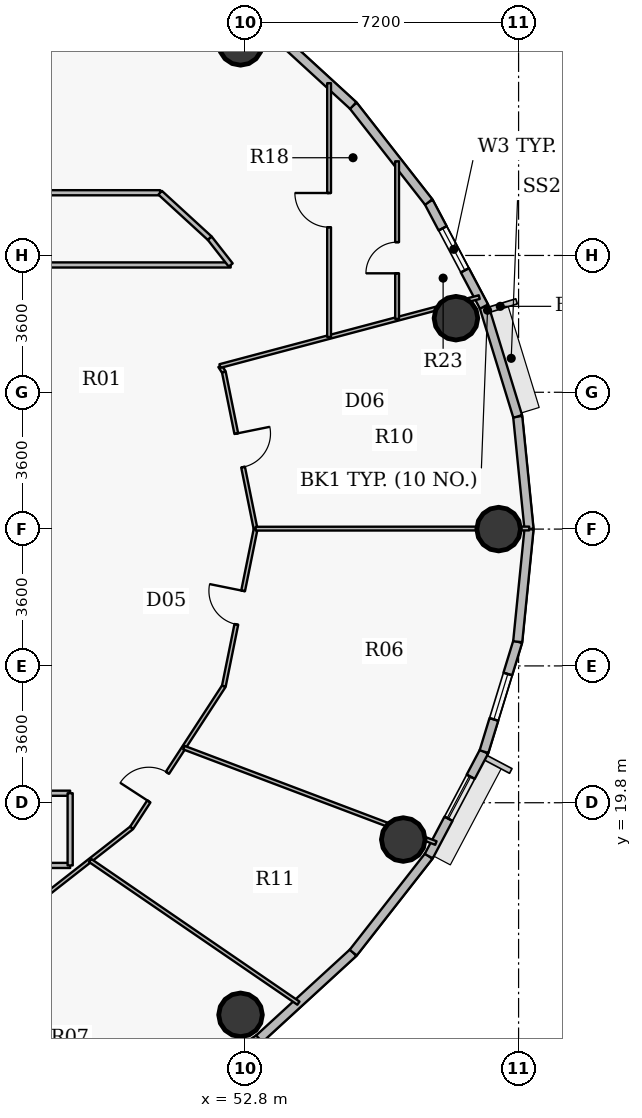
"""IFC4 building model, lengths in metres.
Left out: names, types, materials, properties, quantities, classifications, styles, units other than length and angle.
Written with IfcOpenShell. Run it as: python <this file> out.ifc"""

import sys

from ifc_helpers import new_model, si_unit, direction, frame, frame_2d, origin, origin_2d, place, context, subcontext, project, spatial, rectangle, hollow_circle, extrude, source, transform, mapped, element, fill, save


model = new_model("IFC4")
c1 = context("Model", 3, precision=1e-05, world=origin(), true_north=direction((0.0, 1.0)))
c2 = subcontext(c1, "Body", "Model", "MODEL_VIEW")
j1 = project(units=[si_unit("LENGTHUNIT", "METRE"), si_unit("PLANEANGLEUNIT", "RADIAN")], contexts=[c1])
p1 = place(None, origin())
s1 = spatial("IfcSite", under=j1, at=p1, CompositionType="ELEMENT")
p2 = place(p1, origin())
s2 = spatial("IfcBuilding", under=s1, at=p2, CompositionType="ELEMENT")
p3 = place(p2, frame((0.0, 0.0, 244.05)))
s3 = spatial("IfcBuildingStorey", under=s2, at=p3, CompositionType="ELEMENT", Elevation=244.05)
for number, where, z_axis, x_axis in (
    (1, (59.475, 27.0, 0.0), (0.0, 0.0, 1.0), (1.0, 0.0, 0.0)),
    (2, (58.351, 32.549, 0.0), (0.0, 0.0, 1.0), (1.0, 0.0, 0.0)),
    (3, (52.683, 39.781, 0.0), (0.0, 0.0, 1.0), (1.0, 0.0, 0.0)),
    (4, (52.683, 14.219, 0.0), (0.0, 0.0, 1.0), (1.0, 0.0, 0.0)),
    (5, (56.965, 18.831, 0.0), (0.0, 0.0, 1.0), (1.0, 0.0, 0.0)),
):
    element("IfcColumn", number, at=place(p3, frame(where, z_axis=z_axis, x_axis=x_axis)), inside=s3, PredefinedType="COLUMN", context=c2, shape_type="SweptSolid", body=[
        extrude(hollow_circle(Radius=0.575, WallThickness=0.036, at=origin_2d()), origin(), (0.0, 0.0, 1.0), 3.75),
    ])
p4 = place(p3, frame((59.977, 29.964, 0.0), z_axis=(0.0, 0.0, 1.0), x_axis=(0.099990595253, -0.994988382274, 0.0)))
e6 = element("IfcWall", 6, at=p4, inside=s3, PredefinedType="SOLIDWALL", context=c2, shape_type="SweptSolid", body=[
    extrude(rectangle(XDim=2.979, YDim=0.24, at=frame_2d((1.489, 0.0))), origin(), (0.0, 0.0, 1.0), 3.5),
])
p5 = place(p3, frame((59.09, 32.856, 0.0), z_axis=(0.0, 0.0, 1.0), x_axis=(0.293132907334, -0.95607170162, 0.0)))
e7 = element("IfcWall", 7, at=p5, inside=s3, PredefinedType="SOLIDWALL", context=c2, shape_type="SweptSolid", body=[
    extrude(rectangle(XDim=3.025, YDim=0.24, at=frame_2d((1.512, 0.0))), origin(), (0.0, 0.0, 1.0), 3.5),
])
p6 = place(p3, frame((57.636, 35.605, 0.0), z_axis=(0.0, 0.0, 1.0), x_axis=(0.46766049993, -0.883908172157, 0.0)))
e8 = element("IfcWall", 8, at=p6, inside=s3, PredefinedType="SOLIDWALL", context=c2, shape_type="SweptSolid", body=[
    extrude(rectangle(XDim=3.11, YDim=0.24, at=frame_2d((1.555, 0.0))), origin(), (0.0, 0.0, 1.0), 3.5),
])
p7 = place(p6, frame((0.782, 0.0, 0.9)))
e9 = element("IfcOpeningElement", 9, at=p7, cuts=e8, PredefinedType="OPENING", context=c2, shape_type="SweptSolid", body=[
    extrude(rectangle(XDim=1.25, YDim=1.65, at=origin_2d()), frame((0.625, 0.13, 0.825), z_axis=(0.0, -1.0, 0.0), x_axis=(1.0, 0.0, 0.0)), (0.0, 0.0, 1.0), 0.26),
])
p8 = place(p3, frame((55.648, 38.145, 0.0), z_axis=(0.0, 0.0, 1.0), x_axis=(0.616312344705, -0.787501805562, 0.0)))
e10 = element("IfcWall", 10, at=p8, inside=s3, PredefinedType="SOLIDWALL", context=c2, shape_type="SweptSolid", body=[
    extrude(rectangle(XDim=3.225, YDim=0.24, at=frame_2d((1.612, 0.0))), origin(), (0.0, 0.0, 1.0), 3.5),
])
p9 = place(p3, frame((53.176, 40.411, 0.0), z_axis=(0.0, 0.0, 1.0), x_axis=(0.737123922599, -0.675757591694, 0.0)))
e11 = element("IfcWall", 11, at=p9, inside=s3, PredefinedType="SOLIDWALL", context=c2, shape_type="SweptSolid", body=[
    extrude(rectangle(XDim=3.354, YDim=0.24, at=frame_2d((1.677, 0.0))), origin(), (0.0, 0.0, 1.0), 3.5),
])
p10 = place(p3, frame((53.176, 13.589, 0.0), z_axis=(0.0, 0.0, 1.0), x_axis=(-0.831262496074, -0.555880079352, 0.0)))
e12 = element("IfcWall", 12, at=p10, inside=s3, PredefinedType="SOLIDWALL", context=c2, shape_type="SweptSolid", body=[
    extrude(rectangle(XDim=3.484, YDim=0.24, at=frame_2d((1.742, 0.0))), origin(), (0.0, 0.0, 1.0), 3.5),
])
p11 = place(p3, frame((55.648, 15.855, 0.0), z_axis=(0.0, 0.0, 1.0), x_axis=(-0.737123922599, -0.675757591694, 0.0)))
e13 = element("IfcWall", 13, at=p11, inside=s3, PredefinedType="SOLIDWALL", context=c2, shape_type="SweptSolid", body=[
    extrude(rectangle(XDim=3.354, YDim=0.24, at=frame_2d((1.677, 0.0))), origin(), (0.0, 0.0, 1.0), 3.5),
])
p12 = place(p3, frame((57.636, 18.395, 0.0), z_axis=(0.0, 0.0, 1.0), x_axis=(-0.616312344705, -0.787501805562, 0.0)))
e14 = element("IfcWall", 14, at=p12, inside=s3, PredefinedType="SOLIDWALL", context=c2, shape_type="SweptSolid", body=[
    extrude(rectangle(XDim=3.225, YDim=0.24, at=frame_2d((1.612, 0.0))), origin(), (0.0, 0.0, 1.0), 3.5),
])
p13 = place(p3, frame((59.09, 21.144, 0.0), z_axis=(0.0, 0.0, 1.0), x_axis=(-0.46766049993, -0.883908172157, 0.0)))
e15 = element("IfcWall", 15, at=p13, inside=s3, PredefinedType="SOLIDWALL", context=c2, shape_type="SweptSolid", body=[
    extrude(rectangle(XDim=3.11, YDim=0.24, at=frame_2d((1.555, 0.0))), origin(), (0.0, 0.0, 1.0), 3.5),
])
p14 = place(p13, frame((0.748, 0.0, 0.9)))
e16 = element("IfcOpeningElement", 16, at=p14, cuts=e15, PredefinedType="OPENING", context=c2, shape_type="SweptSolid", body=[
    extrude(rectangle(XDim=1.25, YDim=1.65, at=origin_2d()), frame((0.625, 0.13, 0.825), z_axis=(0.0, -1.0, 0.0), x_axis=(1.0, 0.0, 0.0)), (0.0, 0.0, 1.0), 0.26),
])
p15 = place(p3, frame((59.977, 24.036, 0.0), z_axis=(0.0, 0.0, 1.0), x_axis=(-0.293132907334, -0.95607170162, 0.0)))
e17 = element("IfcWall", 17, at=p15, inside=s3, PredefinedType="SOLIDWALL", context=c2, shape_type="SweptSolid", body=[
    extrude(rectangle(XDim=3.025, YDim=0.24, at=frame_2d((1.512, 0.0))), origin(), (0.0, 0.0, 1.0), 3.5),
])
p16 = place(p15, frame((0.887, 0.0, 0.9)))
e18 = element("IfcOpeningElement", 18, at=p16, cuts=e17, PredefinedType="OPENING", context=c2, shape_type="SweptSolid", body=[
    extrude(rectangle(XDim=1.25, YDim=1.65, at=origin_2d()), frame((0.625, 0.13, 0.825), z_axis=(0.0, -1.0, 0.0), x_axis=(1.0, 0.0, 0.0)), (0.0, 0.0, 1.0), 0.26),
])
p17 = place(p3, frame((60.275, 27.0, 0.0), z_axis=(0.0, 0.0, 1.0), x_axis=(-0.099990595253, -0.994988382274, 0.0)))
e19 = element("IfcWall", 19, at=p17, inside=s3, PredefinedType="SOLIDWALL", context=c2, shape_type="SweptSolid", body=[
    extrude(rectangle(XDim=2.979, YDim=0.24, at=frame_2d((1.489, 0.0))), origin(), (0.0, 0.0, 1.0), 3.5),
])
p18 = place(p3, frame((24.35, 18.15, 0.0), z_axis=(0.0, 0.0, 1.0), x_axis=(1.0, 0.0, 0.0)))
e20 = element("IfcWall", 20, at=p18, inside=s3, PredefinedType="PARTITIONING", context=c2, shape_type="SweptSolid", body=[
    extrude(rectangle(XDim=23.85, YDim=0.135, at=frame_2d((11.925, 0.0))), origin(), (0.0, 0.0, 1.0), 2.935),
])
p19 = place(p18, frame((10.168, 0.0, 0.0)))
e21 = element("IfcOpeningElement", 21, at=p19, cuts=e20, PredefinedType="OPENING", context=c2, shape_type="SweptSolid", body=[
    extrude(rectangle(XDim=1.0, YDim=2.15, at=origin_2d()), frame((0.5, 0.078, 1.075), z_axis=(0.0, -1.0, 0.0), x_axis=(1.0, 0.0, 0.0)), (0.0, 0.0, 1.0), 0.155),
])
p20 = place(p3, frame((24.35, 35.85, 0.0), z_axis=(0.0, 0.0, 1.0), x_axis=(1.0, 0.0, 0.0)))
e22 = element("IfcWall", 22, at=p20, inside=s3, PredefinedType="PARTITIONING", context=c2, shape_type="SweptSolid", body=[
    extrude(rectangle(XDim=26.218, YDim=0.135, at=frame_2d((13.109, 0.0))), origin(), (0.0, 0.0, 1.0), 2.935),
])
p21 = place(p20, frame((22.062, 0.0, 0.0)))
e23 = element("IfcOpeningElement", 23, at=p21, cuts=e22, PredefinedType="OPENING", context=c2, shape_type="SweptSolid", body=[
    extrude(rectangle(XDim=1.0, YDim=2.15, at=origin_2d()), frame((0.5, 0.078, 1.075), z_axis=(0.0, -1.0, 0.0), x_axis=(1.0, 0.0, 0.0)), (0.0, 0.0, 1.0), 0.155),
])
p22 = place(p20, frame((11.214, 0.0, 0.0)))
e24 = element("IfcOpeningElement", 24, at=p22, cuts=e22, PredefinedType="OPENING", context=c2, shape_type="SweptSolid", body=[
    extrude(rectangle(XDim=1.0, YDim=2.15, at=origin_2d()), frame((0.5, 0.078, 1.075), z_axis=(0.0, -1.0, 0.0), x_axis=(1.0, 0.0, 0.0)), (0.0, 0.0, 1.0), 0.155),
])
p23 = place(p3, frame((43.295, 35.85, 0.0), z_axis=(0.0, 0.0, 1.0), x_axis=(0.636076542552, 0.771625966395, 0.0)))
e25 = element("IfcWall", 25, at=p23, inside=s3, PredefinedType="PARTITIONING", context=c2, shape_type="SweptSolid", body=[
    extrude(rectangle(XDim=9.151, YDim=0.135, at=frame_2d((4.576, 0.0))), origin(), (0.0, 0.0, 1.0), 2.985),
])
p24 = place(p3, frame((45.8, 20.05, 0.0), z_axis=(0.0, 0.0, 1.0), x_axis=(1.0, 0.0, 0.0)))
e26 = element("IfcWall", 26, at=p24, inside=s3, PredefinedType="PARTITIONING", context=c2, shape_type="SweptSolid", body=[
    extrude(rectangle(XDim=2.4, YDim=0.135, at=frame_2d((1.2, 0.0))), origin(), (0.0, 0.0, 1.0), 3.5),
])
p25 = place(p3, frame((45.8, 33.95, 0.0), z_axis=(0.0, 0.0, 1.0), x_axis=(1.0, 0.0, 0.0)))
e27 = element("IfcWall", 27, at=p25, inside=s3, PredefinedType="PARTITIONING", context=c2, shape_type="SweptSolid", body=[
    extrude(rectangle(XDim=6.624, YDim=0.135, at=frame_2d((3.312, 0.0))), origin(), (0.0, 0.0, 1.0), 3.185),
])
p26 = place(p3, frame((46.039, 16.181, 0.0), z_axis=(0.0, 0.0, 1.0), x_axis=(0.787367569585, 0.616483828147, 0.0)))
e28 = element("IfcWall", 28, at=p26, inside=s3, PredefinedType="PARTITIONING", context=c2, shape_type="SweptSolid", body=[
    extrude(rectangle(XDim=4.799, YDim=0.1, at=frame_2d((2.399, 0.0))), origin(), (0.0, 0.0, 1.0), 2.935),
])
p27 = place(p26, frame((0.582, 0.0, 0.0)))
e29 = element("IfcOpeningElement", 29, at=p27, cuts=e28, PredefinedType="OPENING", context=c2, shape_type="SweptSolid", body=[
    extrude(rectangle(XDim=0.9, YDim=2.1, at=origin_2d()), frame((0.45, 0.06, 1.05), z_axis=(0.0, -1.0, 0.0), x_axis=(1.0, 0.0, 0.0)), (0.0, 0.0, 1.0), 0.12),
])
p28 = place(p3, frame((48.2, 18.15, 0.0), z_axis=(0.0, 0.0, 1.0), x_axis=(0.0, 1.0, 0.0)))
e30 = element("IfcWall", 30, at=p28, inside=s3, PredefinedType="PARTITIONING", context=c2, shape_type="SweptSolid", body=[
    extrude(rectangle(XDim=1.9, YDim=0.135, at=frame_2d((0.95, 0.0))), origin(), (0.0, 0.0, 1.0), 3.5),
])
p29 = place(p3, frame((48.724, 18.283, 0.0), z_axis=(0.0, 0.0, 1.0), x_axis=(0.824946647061, -0.565210606325, 0.0)))
e31 = element("IfcWall", 31, at=p29, inside=s3, PredefinedType="PARTITIONING", context=c2, shape_type="SweptSolid", body=[
    extrude(rectangle(XDim=6.646, YDim=0.1, at=frame_2d((3.323, 0.0))), origin(), (0.0, 0.0, 1.0), 2.985),
])
p30 = place(p3, frame((49.818, 19.139, 0.0), z_axis=(0.0, 0.0, 1.0), x_axis=(0.545406924684, 0.83817139447, 0.0)))
e32 = element("IfcWall", 32, at=p30, inside=s3, PredefinedType="PARTITIONING", context=c2, shape_type="SweptSolid", body=[
    extrude(rectangle(XDim=4.448, YDim=0.1, at=frame_2d((2.224, 0.0))), origin(), (0.0, 0.0, 1.0), 2.935),
])
p31 = place(p30, frame((0.829, 0.0, 0.0)))
e33 = element("IfcOpeningElement", 33, at=p31, cuts=e32, PredefinedType="OPENING", context=c2, shape_type="SweptSolid", body=[
    extrude(rectangle(XDim=0.9, YDim=2.1, at=origin_2d()), frame((0.45, 0.06, 1.05), z_axis=(0.0, -1.0, 0.0), x_axis=(1.0, 0.0, 0.0)), (0.0, 0.0, 1.0), 0.12),
])
p32 = place(p3, frame((50.568, 35.85, 0.0), z_axis=(0.0, 0.0, 1.0), x_axis=(0.737102657331, -0.675780787353, 0.0)))
e34 = element("IfcWall", 34, at=p32, inside=s3, PredefinedType="PARTITIONING", context=c2, shape_type="SweptSolid", body=[
    extrude(rectangle(XDim=1.772, YDim=0.135, at=frame_2d((0.886, 0.0))), origin(), (0.0, 0.0, 1.0), 3.5),
])
p33 = place(p3, frame((51.192, 21.25, 0.0), z_axis=(0.0, 0.0, 1.0), x_axis=(0.935252375815, -0.353981628806, 0.0)))
e35 = element("IfcWall", 35, at=p33, inside=s3, PredefinedType="PARTITIONING", context=c2, shape_type="SweptSolid", body=[
    extrude(rectangle(XDim=7.092, YDim=0.1, at=frame_2d((3.546, 0.0))), origin(), (0.0, 0.0, 1.0), 2.935),
])
p34 = place(p3, frame((51.874, 34.653, 0.0), z_axis=(0.0, 0.0, 1.0), x_axis=(0.61628613448, -0.787522317429, 0.0)))
e36 = element("IfcWall", 36, at=p34, inside=s3, PredefinedType="PARTITIONING", context=c2, shape_type="SweptSolid", body=[
    extrude(rectangle(XDim=0.893, YDim=0.135, at=frame_2d((0.446, 0.0))), origin(), (0.0, 0.0, 1.0), 3.5),
])
p35 = place(p3, frame((52.142, 31.29, 0.0), z_axis=(0.0, 0.0, 1.0), x_axis=(0.545079581712, -0.838384309014, 0.0)))
e37 = element("IfcWall", 37, at=p35, inside=s3, PredefinedType="PARTITIONING", context=c2, shape_type="SweptSolid", body=[
    extrude(rectangle(XDim=0.188, YDim=0.1, at=frame_2d((0.094, 0.0))), origin(), (0.0, 0.0, 1.0), 2.935),
])
p36 = place(p3, frame((52.142, 31.29, 0.0), z_axis=(0.0, 0.0, 1.0), x_axis=(0.966448115653, 0.256861907939, 0.0)))
e38 = element("IfcWall", 38, at=p36, inside=s3, PredefinedType="PARTITIONING", context=c2, shape_type="SweptSolid", body=[
    extrude(rectangle(XDim=7.06, YDim=0.1, at=frame_2d((3.53, 0.0))), origin(), (0.0, 0.0, 1.0), 2.985),
])
p37 = place(p3, frame((52.244, 22.867, 0.0), z_axis=(0.0, 0.0, 1.0), x_axis=(0.198264809747, 0.980148491411, 0.0)))
e39 = element("IfcWall", 39, at=p37, inside=s3, PredefinedType="PARTITIONING", context=c2, shape_type="SweptSolid", body=[
    extrude(rectangle(XDim=4.216, YDim=0.1, at=frame_2d((2.108, 0.0))), origin(), (0.0, 0.0, 1.0), 2.935),
])
p38 = place(p37, frame((1.658, 0.0, 0.0)))
e40 = element("IfcOpeningElement", 40, at=p38, cuts=e39, PredefinedType="OPENING", context=c2, shape_type="SweptSolid", body=[
    extrude(rectangle(XDim=0.9, YDim=2.1, at=origin_2d()), frame((0.45, 0.06, 1.05), z_axis=(0.0, -1.0, 0.0), x_axis=(1.0, 0.0, 0.0)), (0.0, 0.0, 1.0), 0.12),
])
p39 = place(p3, frame((52.244, 31.133, 0.0), z_axis=(0.0, 0.0, 1.0), x_axis=(0.198259251193, -0.980149615781, 0.0)))
e41 = element("IfcWall", 41, at=p39, inside=s3, PredefinedType="PARTITIONING", context=c2, shape_type="SweptSolid", body=[
    extrude(rectangle(XDim=4.205, YDim=0.1, at=frame_2d((2.103, 0.0))), origin(), (0.0, 0.0, 1.0), 2.935),
])
p40 = place(p39, frame((1.653, 0.0, 0.0)))
e42 = element("IfcOpeningElement", 42, at=p40, cuts=e41, PredefinedType="OPENING", context=c2, shape_type="SweptSolid", body=[
    extrude(rectangle(XDim=0.9, YDim=2.1, at=origin_2d()), frame((0.45, 0.06, 1.05), z_axis=(0.0, -1.0, 0.0), x_axis=(1.0, 0.0, 0.0)), (0.0, 0.0, 1.0), 0.12),
])
p41 = place(p3, frame((53.082, 27.011, 0.0), z_axis=(0.0, 0.0, 1.0), x_axis=(0.999999792251, 0.000644592077, 0.0)))
e43 = element("IfcWall", 43, at=p41, inside=s3, PredefinedType="PARTITIONING", context=c2, shape_type="SweptSolid", body=[
    extrude(rectangle(XDim=7.196, YDim=0.1, at=frame_2d((3.598, 0.0))), origin(), (0.0, 0.0, 1.0), 2.935),
])
p42 = place(p3, frame((55.014, 32.053, 0.0), z_axis=(0.0, 0.0, 1.0), x_axis=(0.0, 1.0, 0.0)))
e44 = element("IfcWall", 44, at=p42, inside=s3, PredefinedType="PARTITIONING", context=c2, shape_type="SweptSolid", body=[
    extrude(rectangle(XDim=6.68, YDim=0.1, at=frame_2d((3.34, 0.0))), origin(), (0.0, 0.0, 1.0), 2.985),
])
p43 = place(p42, frame((2.89, 0.0, 0.0)))
e45 = element("IfcOpeningElement", 45, at=p43, cuts=e44, PredefinedType="OPENING", context=c2, shape_type="SweptSolid", body=[
    extrude(rectangle(XDim=0.9, YDim=2.1, at=origin_2d()), frame((0.45, 0.06, 1.05), z_axis=(0.0, -1.0, 0.0), x_axis=(1.0, 0.0, 0.0)), (0.0, 0.0, 1.0), 0.12),
])
p44 = place(p3, frame((56.803, 32.529, 0.0), z_axis=(0.0, 0.0, 1.0), x_axis=(0.0, 1.0, 0.0)))
e46 = element("IfcWall", 46, at=p44, inside=s3, PredefinedType="PARTITIONING", context=c2, shape_type="SweptSolid", body=[
    extrude(rectangle(XDim=4.148, YDim=0.1, at=frame_2d((2.074, 0.0))), origin(), (0.0, 0.0, 1.0), 2.985),
])
p45 = place(p44, frame((1.201, 0.0, 0.0)))
e47 = element("IfcOpeningElement", 47, at=p45, cuts=e46, PredefinedType="OPENING", context=c2, shape_type="SweptSolid", body=[
    extrude(rectangle(XDim=0.82, YDim=2.1, at=origin_2d()), frame((0.41, 0.06, 1.05), z_axis=(0.0, -1.0, 0.0), x_axis=(1.0, 0.0, 0.0)), (0.0, 0.0, 1.0), 0.12),
])
m1 = source(origin(), c2, "Body", "SweptSolid", [
    extrude(rectangle(XDim=1.25, YDim=1.65, at=origin_2d()), frame((0.625, 0.03, 0.825), z_axis=(0.0, -1.0, 0.0), x_axis=(1.0, 0.0, 0.0)), (0.0, 0.0, 1.0), 0.06),
])
p46 = place(p7, origin())
e48 = element("IfcWindow", 48, at=p46, inside=s3, PartitioningType="SINGLE_PANEL", PredefinedType="WINDOW", context=c2, shape_type="MappedRepresentation", body=[
    mapped(m1, transform((0.0, 0.0, 0.0), x_axis=(1.0, 0.0, 0.0), y_axis=(0.0, 1.0, 0.0), z_axis=(0.0, 0.0, 1.0), scale=1.0)),
])
fill(e9, e48)
p47 = place(p14, origin())
e49 = element("IfcWindow", 49, at=p47, inside=s3, PartitioningType="SINGLE_PANEL", PredefinedType="WINDOW", context=c2, shape_type="MappedRepresentation", body=[
    mapped(m1, transform((0.0, 0.0, 0.0), x_axis=(1.0, 0.0, 0.0), y_axis=(0.0, 1.0, 0.0), z_axis=(0.0, 0.0, 1.0), scale=1.0)),
])
fill(e16, e49)
p48 = place(p16, origin())
e50 = element("IfcWindow", 50, at=p48, inside=s3, PartitioningType="SINGLE_PANEL", PredefinedType="WINDOW", context=c2, shape_type="MappedRepresentation", body=[
    mapped(m1, transform((0.0, 0.0, 0.0), x_axis=(1.0, 0.0, 0.0), y_axis=(0.0, 1.0, 0.0), z_axis=(0.0, 0.0, 1.0), scale=1.0)),
])
fill(e18, e50)
m2 = source(origin(), c2, "Body", "SweptSolid", [
    extrude(rectangle(XDim=0.9, YDim=2.1, at=origin_2d()), frame((0.45, 0.025, 1.05), z_axis=(0.0, -1.0, 0.0), x_axis=(1.0, 0.0, 0.0)), (0.0, 0.0, 1.0), 0.05),
])
p49 = place(p31, origin())
e51 = element("IfcDoor", 51, at=p49, inside=s3, OperationType="SINGLE_SWING_LEFT", PredefinedType="DOOR", context=c2, shape_type="MappedRepresentation", body=[
    mapped(m2, transform((0.0, 0.0, 0.0), x_axis=(1.0, 0.0, 0.0), y_axis=(0.0, 1.0, 0.0), z_axis=(0.0, 0.0, 1.0), scale=1.0)),
])
fill(e33, e51)
p50 = place(p38, origin())
e52 = element("IfcDoor", 52, at=p50, inside=s3, OperationType="SINGLE_SWING_RIGHT", PredefinedType="DOOR", context=c2, shape_type="MappedRepresentation", body=[
    mapped(m2, transform((0.0, 0.0, 0.0), x_axis=(1.0, 0.0, 0.0), y_axis=(0.0, 1.0, 0.0), z_axis=(0.0, 0.0, 1.0), scale=1.0)),
])
fill(e40, e52)
p51 = place(p40, origin())
e53 = element("IfcDoor", 53, at=p51, inside=s3, OperationType="SINGLE_SWING_LEFT", PredefinedType="DOOR", context=c2, shape_type="MappedRepresentation", body=[
    mapped(m2, transform((0.0, 0.0, 0.0), x_axis=(1.0, 0.0, 0.0), y_axis=(0.0, 1.0, 0.0), z_axis=(0.0, 0.0, 1.0), scale=1.0)),
])
fill(e42, e53)
p52 = place(p43, origin())
e54 = element("IfcDoor", 54, at=p52, inside=s3, OperationType="SINGLE_SWING_RIGHT", PredefinedType="DOOR", context=c2, shape_type="MappedRepresentation", body=[
    mapped(m2, transform((0.0, 0.0, 0.0), x_axis=(1.0, 0.0, 0.0), y_axis=(0.0, 1.0, 0.0), z_axis=(0.0, 0.0, 1.0), scale=1.0)),
])
fill(e45, e54)
m3 = source(origin(), c2, "Body", "SweptSolid", [
    extrude(rectangle(XDim=0.82, YDim=2.1, at=origin_2d()), frame((0.41, 0.025, 1.05), z_axis=(0.0, -1.0, 0.0), x_axis=(1.0, 0.0, 0.0)), (0.0, 0.0, 1.0), 0.05),
])
p53 = place(p45, origin())
e55 = element("IfcDoor", 55, at=p53, inside=s3, OperationType="SINGLE_SWING_LEFT", PredefinedType="DOOR", context=c2, shape_type="MappedRepresentation", body=[
    mapped(m3, transform((0.0, 0.0, 0.0), x_axis=(1.0, 0.0, 0.0), y_axis=(0.0, 1.0, 0.0), z_axis=(0.0, 0.0, 1.0), scale=1.0)),
])
fill(e47, e55)
save(model, sys.argv[1])
